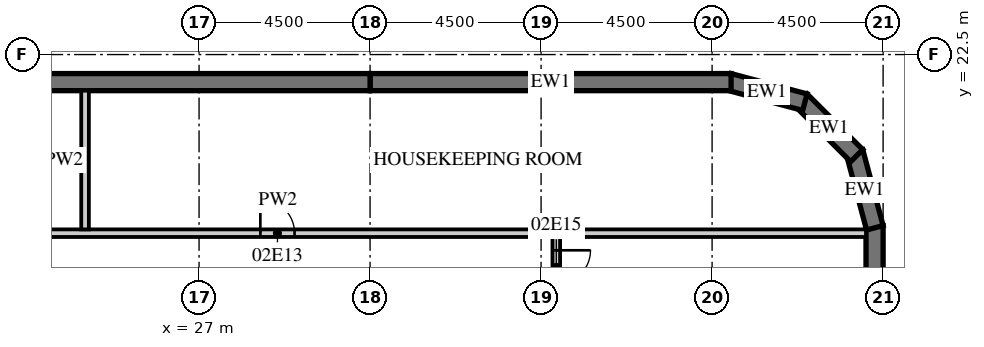
"""IFC4 building model, lengths in metres.
Left out: names, types, materials, properties, quantities, classifications, styles, units other than length and angle.
Written with IfcOpenShell. Run it as: python <this file> out.ifc"""

import sys

from ifc_helpers import new_model, si_unit, direction, frame, frame_2d, origin, place, context, subcontext, project, spatial, polyline, rectangle, outline, extrude, element, fill, save


model = new_model("IFC4")
c1 = context("Model", 3, precision=1e-05, world=origin(), true_north=direction((0.0, 1.0)))
c2 = subcontext(c1, "Body", "Model", "MODEL_VIEW")
j1 = project(units=[si_unit("LENGTHUNIT", "METRE"), si_unit("PLANEANGLEUNIT", "RADIAN")], contexts=[c1])
p1 = place(None, origin())
s1 = spatial("IfcSite", under=j1, at=p1, CompositionType="ELEMENT")
p2 = place(p1, origin())
s2 = spatial("IfcBuilding", under=s1, at=p2, CompositionType="ELEMENT")
p3 = place(p2, frame((0.0, 0.0, 17.0)))
s3 = spatial("IfcBuildingStorey", under=s2, at=p3, CompositionType="ELEMENT", Elevation=17.0)
p4 = place(p3, frame((44.775, -18.0, 0.0), z_axis=(0.0, 0.0, 1.0), x_axis=(0.0, 1.0, 0.0)))
e1 = element("IfcWall", 1, at=p4, inside=s3, PredefinedType="SOLIDWALL", context=c2, shape_type="SweptSolid", body=[
    extrude(rectangle(XDim=36.0, YDim=0.45, at=frame_2d((18.0, 0.0))), origin(), (0.0, 0.0, 1.0), 6.05),
])
p5 = place(p4, frame((4.05, 0.0, 0.9)))
e2 = element("IfcOpeningElement", 2, at=p5, cuts=e1, PredefinedType="OPENING", context=c2, shape_type="SweptSolid", body=[
    extrude(rectangle(XDim=3.0, YDim=1.8, at=frame_2d((1.5, 0.9))), frame((0.0, 0.235, 0.0), z_axis=(0.0, -1.0, 0.0), x_axis=(1.0, 0.0, 0.0)), (0.0, 0.0, 1.0), 0.47),
])
p6 = place(p3, frame((44.783, 17.942, 0.0), z_axis=(0.0, 0.0, 1.0), x_axis=(-0.25881466832, 0.965926999034, 0.0)))
e3 = element("IfcWall", 3, at=p6, inside=s3, PredefinedType="SOLIDWALL", context=c2, shape_type="SweptSolid", body=[
    extrude(outline(polyline([(0.0, -0.225), (2.071, -0.225), (1.95, 0.225), (0.121, 0.225), (0.0, -0.225)])), origin(), (0.0, 0.0, 1.0), 6.05),
])
p7 = place(p3, frame((44.305, 19.841, 0.0), z_axis=(0.0, 0.0, 1.0), x_axis=(-0.707106781187, 0.707106781187, 0.0)))
e4 = element("IfcWall", 4, at=p7, inside=s3, PredefinedType="SOLIDWALL", context=c2, shape_type="SweptSolid", body=[
    extrude(outline(polyline([(0.0, -0.225), (2.071, -0.225), (1.95, 0.225), (0.121, 0.225), (0.0, -0.225)])), origin(), (0.0, 0.0, 1.0), 6.05),
])
p8 = place(p3, frame((42.942, 21.247, 0.0), z_axis=(0.0, 0.0, 1.0), x_axis=(-0.965926999034, 0.25881466832, 0.0)))
e5 = element("IfcWall", 5, at=p8, inside=s3, PredefinedType="SOLIDWALL", context=c2, shape_type="SweptSolid", body=[
    extrude(outline(polyline([(-0.0, -0.225), (2.07, -0.225), (1.95, 0.225), (0.12, 0.225), (-0.0, -0.225)])), origin(), (0.0, 0.0, 1.0), 6.05),
])
p9 = place(p3, frame((41.0, 21.775, 0.0), z_axis=(0.0, 0.0, 1.0), x_axis=(-1.0, 0.0, 0.0)))
e6 = element("IfcWall", 6, at=p9, inside=s3, PredefinedType="SOLIDWALL", context=c2, shape_type="SweptSolid", body=[
    extrude(rectangle(XDim=9.5, YDim=0.45, at=frame_2d((4.75, 0.0))), origin(), (0.0, 0.0, 1.0), 6.05),
])
p10 = place(p3, frame((31.5, 21.775, 0.0), z_axis=(0.0, 0.0, 1.0), x_axis=(-1.0, 0.0, 0.0)))
e7 = element("IfcWall", 7, at=p10, inside=s3, PredefinedType="SOLIDWALL", context=c2, shape_type="SweptSolid", body=[
    extrude(rectangle(XDim=18.0, YDim=0.45, at=frame_2d((9.0, 0.0))), origin(), (0.0, 0.0, 1.0), 6.05),
])
p11 = place(p3, frame((36.4, 1.75, 0.0), z_axis=(0.0, 0.0, 1.0), x_axis=(0.0, 1.0, 0.0)))
e8 = element("IfcWall", 8, at=p11, inside=s3, PredefinedType="PARTITIONING", context=c2, shape_type="SweptSolid", body=[
    extrude(rectangle(XDim=15.95, YDim=0.2, at=frame_2d((7.975, 0.0))), origin(), (0.0, 0.0, 1.0), 6.05),
])
p12 = place(p11, frame((14.7, 0.0, 0.0)))
e9 = element("IfcOpeningElement", 9, at=p12, cuts=e8, PredefinedType="OPENING", context=c2, shape_type="SweptSolid", body=[
    extrude(rectangle(XDim=0.9, YDim=2.1, at=frame_2d((0.45, 1.05))), frame((0.0, 0.11, 0.0), z_axis=(0.0, -1.0, 0.0), x_axis=(1.0, 0.0, 0.0)), (0.0, 0.0, 1.0), 0.22),
])
p13 = place(p3, frame((13.6, 17.8, 0.0), z_axis=(0.0, 0.0, 1.0), x_axis=(1.0, 0.0, 0.0)))
e10 = element("IfcWall", 10, at=p13, inside=s3, PredefinedType="PARTITIONING", context=c2, shape_type="SweptSolid", body=[
    extrude(rectangle(XDim=30.95, YDim=0.2, at=frame_2d((15.475, 0.0))), origin(), (0.0, 0.0, 1.0), 6.05),
])
p14 = place(p13, frame((15.012, 0.0, 0.0)))
e11 = element("IfcOpeningElement", 11, at=p14, cuts=e10, PredefinedType="OPENING", context=c2, shape_type="SweptSolid", body=[
    extrude(rectangle(XDim=0.9, YDim=2.1, at=frame_2d((0.45, 1.05))), frame((0.0, 0.11, 0.0), z_axis=(0.0, -1.0, 0.0), x_axis=(1.0, 0.0, 0.0)), (0.0, 0.0, 1.0), 0.22),
])
p15 = place(p13, frame((6.712, 0.0, 0.0)))
e12 = element("IfcOpeningElement", 12, at=p15, cuts=e10, PredefinedType="OPENING", context=c2, shape_type="SweptSolid", body=[
    extrude(rectangle(XDim=0.9, YDim=2.1, at=frame_2d((0.45, 1.05))), frame((0.0, 0.11, 0.0), z_axis=(0.0, -1.0, 0.0), x_axis=(1.0, 0.0, 0.0)), (0.0, 0.0, 1.0), 0.22),
])
p16 = place(p3, frame((24.0, 17.9, 0.0), z_axis=(0.0, 0.0, 1.0), x_axis=(0.0, 1.0, 0.0)))
e13 = element("IfcWall", 13, at=p16, inside=s3, PredefinedType="PARTITIONING", context=c2, shape_type="SweptSolid", body=[
    extrude(rectangle(XDim=3.65, YDim=0.2, at=frame_2d((1.825, 0.0))), origin(), (0.0, 0.0, 1.0), 6.05),
])
p17 = place(p14, origin())
e14 = element("IfcDoor", 14, at=p17, inside=s3, OperationType="SINGLE_SWING_LEFT", PredefinedType="DOOR", context=c2, shape_type="SweptSolid", body=[
    extrude(rectangle(XDim=0.9, YDim=2.1, at=frame_2d((0.45, 1.05))), frame((0.0, 0.025, 0.0), z_axis=(0.0, -1.0, 0.0), x_axis=(1.0, 0.0, 0.0)), (0.0, 0.0, 1.0), 0.05),
])
fill(e11, e14)
p18 = place(p12, origin())
e15 = element("IfcDoor", 15, at=p18, inside=s3, OperationType="SINGLE_SWING_RIGHT", PredefinedType="DOOR", context=c2, shape_type="SweptSolid", body=[
    extrude(rectangle(XDim=0.9, YDim=2.1, at=frame_2d((0.45, 1.05))), frame((0.0, 0.025, 0.0), z_axis=(0.0, -1.0, 0.0), x_axis=(1.0, 0.0, 0.0)), (0.0, 0.0, 1.0), 0.05),
])
fill(e9, e15)
save(model, sys.argv[1])
